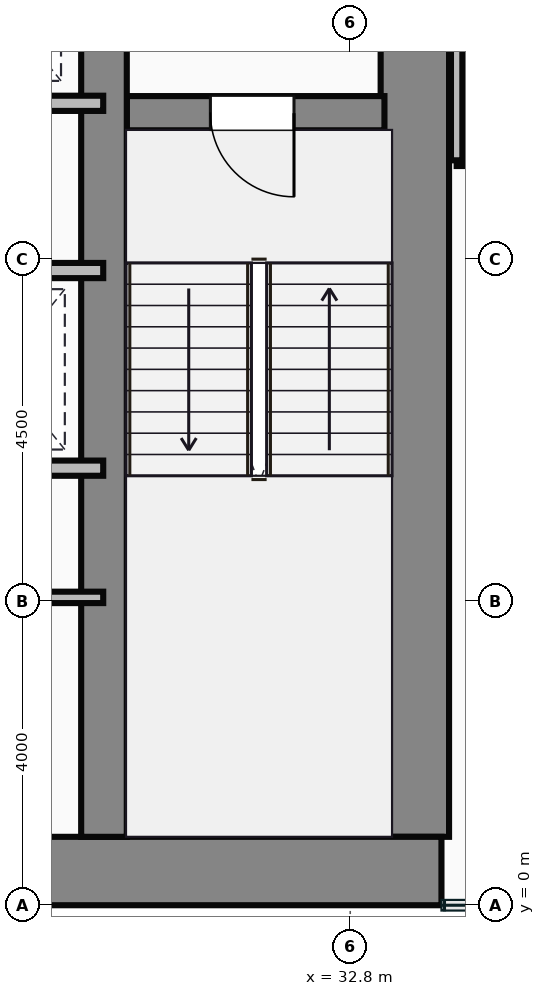
"""IFC4 building model, lengths in metres.
Left out: names, types, materials, properties, quantities, classifications, styles, units other than length and angle.
Written with IfcOpenShell. Run it as: python <this file> out.ifc"""

import sys

from ifc_helpers import new_model, si_unit, direction, frame, frame_2d, origin, place, context, subcontext, project, spatial, rectangle, extrude, source, transform, mapped, element, fill, save


model = new_model("IFC4")
c1 = context("Model", 3, precision=1e-05, world=origin(), true_north=direction((0.0, 1.0)))
c2 = subcontext(c1, "Body", "Model", "MODEL_VIEW")
j1 = project(units=[si_unit("LENGTHUNIT", "METRE"), si_unit("PLANEANGLEUNIT", "RADIAN")], contexts=[c1])
p1 = place(None, origin())
s1 = spatial("IfcSite", under=j1, at=p1, CompositionType="ELEMENT")
p2 = place(p1, origin())
s2 = spatial("IfcBuilding", under=s1, at=p2, CompositionType="ELEMENT")
p3 = place(p2, frame((0.0, 0.0, 54.4)))
s3 = spatial("IfcBuildingStorey", under=s2, at=p3, CompositionType="ELEMENT", Elevation=54.4)
m1 = source(origin(), c2, "Body", "SweptSolid", [
    extrude(rectangle(XDim=29.5, YDim=0.9, at=frame_2d((14.75, 0.0))), origin(), (0.0, 0.0, 1.0), 3.65),
])
p4 = place(p3, frame((4.5, 0.45, 0.0), z_axis=(0.0, 0.0, 1.0), x_axis=(1.0, 0.0, 0.0)))
e1 = element("IfcWall", 1, at=p4, inside=s3, PredefinedType="SHEAR", context=c2, shape_type="MappedRepresentation", body=[
    mapped(m1, transform((0.0, 0.0, 0.0))),
])
m2 = source(origin(), c2, "Body", "SweptSolid", [
    extrude(rectangle(XDim=13.1, YDim=0.9, at=frame_2d((6.55, 0.0))), origin(), (0.0, 0.0, 1.0), 3.65),
])
p5 = place(p3, frame((33.65, 0.9, 0.0), z_axis=(0.0, 0.0, 1.0), x_axis=(0.0, 1.0, 0.0)))
e2 = element("IfcWall", 2, at=p5, inside=s3, PredefinedType="SHEAR", context=c2, shape_type="MappedRepresentation", body=[
    mapped(m2, transform((0.0, 0.0, 0.0))),
])
m3 = source(origin(), c2, "Body", "SweptSolid", [
    extrude(rectangle(XDim=12.2, YDim=0.6, at=frame_2d((6.1, 0.0))), origin(), (0.0, 0.0, 1.0), 3.65),
])
p6 = place(p3, frame((29.56, 0.9, 0.0), z_axis=(0.0, 0.0, 1.0), x_axis=(0.0, 1.0, 0.0)))
e3 = element("IfcWall", 3, at=p6, inside=s3, PredefinedType="SHEAR", context=c2, shape_type="MappedRepresentation", body=[
    mapped(m3, transform((0.0, 0.0, 0.0))),
])
m4 = source(origin(), c2, "Body", "SweptSolid", [
    extrude(rectangle(XDim=3.39, YDim=0.45, at=frame_2d((1.695, 0.0))), origin(), (0.0, 0.0, 1.0), 3.65),
])
p7 = place(p3, frame((29.86, 10.42, 0.0), z_axis=(0.0, 0.0, 1.0), x_axis=(1.0, 0.0, 0.0)))
e4 = element("IfcWall", 4, at=p7, inside=s3, PredefinedType="SHEAR", context=c2, shape_type="MappedRepresentation", body=[
    mapped(m4, transform((0.0, 0.0, 0.0))),
])
p8 = place(p7, frame((1.1, 0.0, 0.0)))
e5 = element("IfcOpeningElement", 5, at=p8, cuts=e4, PredefinedType="OPENING", context=c2, shape_type="SweptSolid", body=[
    extrude(rectangle(XDim=1.1, YDim=2.15, at=frame_2d((0.55, 1.075))), frame((0.0, 0.235, 0.0), z_axis=(0.0, -1.0, 0.0), x_axis=(1.0, 0.0, 0.0)), (0.0, 0.0, 1.0), 0.47),
])
m5 = source(origin(), c2, "Body", "SweptSolid", [
    extrude(rectangle(XDim=8.8, YDim=0.2, at=frame_2d((4.4, 0.0))), origin(), (0.0, 0.0, 1.0), 3.4),
])
p9 = place(p3, frame((20.75, 10.55, 0.0), z_axis=(0.0, 0.0, 1.0), x_axis=(1.0, 0.0, 0.0)))
e6 = element("IfcWall", 6, at=p9, inside=s3, PredefinedType="PARTITIONING", context=c2, shape_type="MappedRepresentation", body=[
    mapped(m5, transform((0.0, 0.0, 0.0))),
])
m6 = source(origin(), c2, "Body", "SweptSolid", [
    extrude(rectangle(XDim=4.55, YDim=0.2, at=frame_2d((2.275, 0.0))), origin(), (0.0, 0.0, 1.0), 3.4),
])
for number, where, z_axis, x_axis in (
    (7, (25.0, 8.35, 0.0), (0.0, 0.0, 1.0), (1.0, 0.0, 0.0)),
    (8, (25.0, 5.75, 0.0), (0.0, 0.0, 1.0), (1.0, 0.0, 0.0)),
):
    element("IfcWall", number, at=place(p3, frame(where, z_axis=z_axis, x_axis=x_axis)), inside=s3, PredefinedType="PARTITIONING", context=c2, shape_type="MappedRepresentation", body=[
        mapped(m6, transform((0.0, 0.0, 0.0))),
    ])
m7 = source(origin(), c2, "Body", "SweptSolid", [
    extrude(rectangle(XDim=4.55, YDim=0.15, at=frame_2d((2.275, 0.0))), origin(), (0.0, 0.0, 1.0), 3.4),
])
p10 = place(p3, frame((25.0, 4.05, 0.0), z_axis=(0.0, 0.0, 1.0), x_axis=(1.0, 0.0, 0.0)))
e9 = element("IfcWall", 9, at=p10, inside=s3, PredefinedType="PARTITIONING", context=c2, shape_type="MappedRepresentation", body=[
    mapped(m7, transform((0.0, 0.0, 0.0))),
])
m8 = source(origin(), c2, "Body", "SweptSolid", [
    extrude(rectangle(XDim=4.8, YDim=0.15, at=frame_2d((2.4, 0.0))), origin(), (0.0, 0.0, 1.0), 3.4),
])
p11 = place(p3, frame((34.2, 9.8, 0.0), z_axis=(0.0, 0.0, 1.0), x_axis=(1.0, 0.0, 0.0)))
e10 = element("IfcWall", 10, at=p11, inside=s3, PredefinedType="PARTITIONING", context=c2, shape_type="MappedRepresentation", body=[
    mapped(m8, transform((0.0, 0.0, 0.0))),
])
m9 = source(origin(), c2, "Body", "SweptSolid", [
    extrude(rectangle(XDim=4.18, YDim=0.15, at=frame_2d((2.09, 0.0))), origin(), (0.0, 0.0, 1.0), 3.4),
])
p12 = place(p3, frame((34.2, 9.8, 0.0), z_axis=(0.0, 0.0, 1.0), x_axis=(0.0, 1.0, 0.0)))
e11 = element("IfcWall", 11, at=p12, inside=s3, PredefinedType="PARTITIONING", context=c2, shape_type="MappedRepresentation", body=[
    mapped(m9, transform((0.0, 0.0, 0.0))),
])
m10 = source(origin(), c2, "Body", "SweptSolid", [
    extrude(rectangle(XDim=1.1, YDim=2.15, at=frame_2d((0.55, 1.075))), frame((0.0, 0.025, 0.0), z_axis=(0.0, -1.0, 0.0), x_axis=(1.0, 0.0, 0.0)), (0.0, 0.0, 1.0), 0.05),
])
p13 = place(p8, frame((1.1, 0.0, 0.0), z_axis=(0.0, 0.0, 1.0), x_axis=(-1.0, 0.0, 0.0)))
e12 = element("IfcDoor", 12, at=p13, inside=s3, OperationType="SINGLE_SWING_RIGHT", PredefinedType="DOOR", context=c2, shape_type="MappedRepresentation", body=[
    mapped(m10, transform((0.0, 0.0, 0.0))),
])
fill(e5, e12)
save(model, sys.argv[1])
